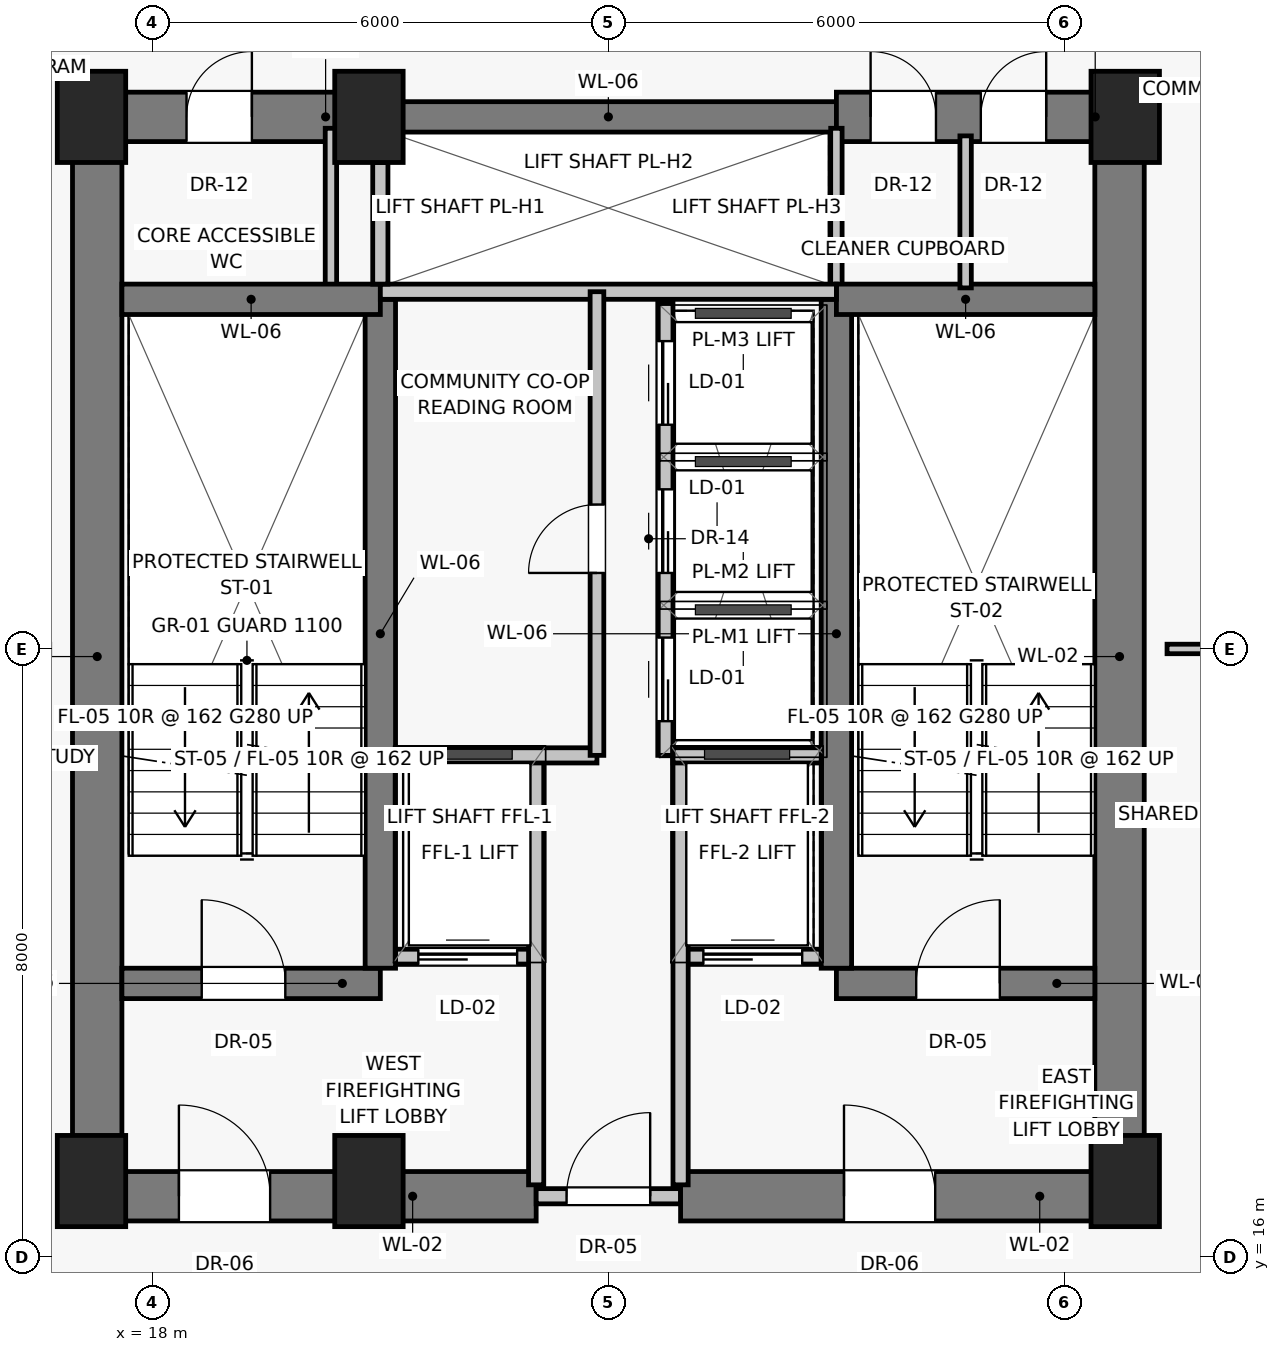
"""IFC4 building model, lengths in metres.
Left out: names, types, materials, properties, quantities, classifications, styles, units other than length and angle.
Written with IfcOpenShell. Run it as: python <this file> out.ifc"""

import sys

from ifc_helpers import new_model, si_unit, direction, frame, frame_2d, origin, origin_2d, place, context, subcontext, project, spatial, rectangle, extrude, source, transform, mapped, element, fill, save


model = new_model("IFC4")
c1 = context("Model", 3, precision=1e-05, world=origin(), true_north=direction((0.0, 1.0)))
c2 = subcontext(c1, "Body", "Model", "MODEL_VIEW")
j1 = project(units=[si_unit("LENGTHUNIT", "METRE"), si_unit("PLANEANGLEUNIT", "RADIAN")], contexts=[c1])
p1 = place(None, origin())
s1 = spatial("IfcSite", under=j1, at=p1, CompositionType="ELEMENT")
p2 = place(p1, origin())
s2 = spatial("IfcBuilding", under=s1, at=p2, CompositionType="ELEMENT")
p3 = place(p2, frame((0.0, 0.0, 113.25)))
s3 = spatial("IfcBuildingStorey", under=s2, at=p3, CompositionType="ELEMENT", Elevation=113.25)
for number, where, z_axis, x_axis in (
    (1, (17.2, 17.0, 0.0), (0.0, 0.0, 1.0), (1.0, 0.0, 0.0)),
    (2, (20.85, 17.0, 0.0), (0.0, 0.0, 1.0), (1.0, 0.0, 0.0)),
    (3, (30.8, 17.0, 0.0), (0.0, 0.0, 1.0), (1.0, 0.0, 0.0)),
    (4, (17.2, 31.0, 0.0), (0.0, 0.0, 1.0), (1.0, 0.0, 0.0)),
    (5, (20.85, 31.0, 0.0), (0.0, 0.0, 1.0), (1.0, 0.0, 0.0)),
    (6, (30.8, 31.0, 0.0), (0.0, 0.0, 1.0), (1.0, 0.0, 0.0)),
):
    element("IfcColumn", number, at=place(p3, frame(where, z_axis=z_axis, x_axis=x_axis)), inside=s3, PredefinedType="PILASTER", context=c2, shape_type="SweptSolid", body=[
        extrude(rectangle(XDim=0.9, YDim=1.2, at=origin_2d()), origin(), (0.0, 0.0, 1.0), 3.25),
    ])
for number, where, z_axis, x_axis in (
    (7, (17.275, 16.8, 0.0), (0.0, 0.0, 1.0), (0.0, 1.0, 0.0)),
    (8, (30.725, 16.8, 0.0), (0.0, 0.0, 1.0), (0.0, 1.0, 0.0)),
):
    element("IfcWall", number, at=place(p3, frame(where, z_axis=z_axis, x_axis=x_axis)), inside=s3, PredefinedType="SHEAR", context=c2, shape_type="SweptSolid", body=[
        extrude(rectangle(XDim=14.2, YDim=0.65, at=frame_2d((7.1, 0.0))), origin(), (0.0, 0.0, 1.0), 3.0),
    ])
p4 = place(p3, frame((17.2, 16.8, 0.0), z_axis=(0.0, 0.0, 1.0), x_axis=(1.0, 0.0, 0.0)))
e9 = element("IfcWall", 9, at=p4, inside=s3, PredefinedType="SHEAR", context=c2, shape_type="SweptSolid", body=[
    extrude(rectangle(XDim=5.85, YDim=0.65, at=frame_2d((2.925, 0.0))), origin(), (0.0, 0.0, 1.0), 3.0),
])
p5 = place(p4, frame((1.15, 0.0, 0.0)))
e10 = element("IfcOpeningElement", 10, at=p5, cuts=e9, PredefinedType="OPENING", context=c2, shape_type="SweptSolid", body=[
    extrude(rectangle(XDim=1.2, YDim=2.03, at=frame_2d((0.6, 1.015))), frame((0.0, 0.335, 0.0), z_axis=(0.0, -1.0, 0.0), x_axis=(1.0, 0.0, 0.0)), (0.0, 0.0, 1.0), 0.67),
])
p6 = place(p3, frame((23.05, 16.8, 0.0), z_axis=(0.0, 0.0, 1.0), x_axis=(1.0, 0.0, 0.0)))
e11 = element("IfcWall", 11, at=p6, inside=s3, PredefinedType="SOLIDWALL", context=c2, shape_type="SweptSolid", body=[
    extrude(rectangle(XDim=1.9, YDim=0.2, at=frame_2d((0.95, 0.0))), origin(), (0.0, 0.0, 1.0), 2.15),
])
p7 = place(p6, frame((0.4, 0.0, 0.0)))
e12 = element("IfcOpeningElement", 12, at=p7, cuts=e11, PredefinedType="OPENING", context=c2, shape_type="SweptSolid", body=[
    extrude(rectangle(XDim=1.1, YDim=2.03, at=frame_2d((0.55, 1.015))), frame((0.0, 0.11, 0.0), z_axis=(0.0, -1.0, 0.0), x_axis=(1.0, 0.0, 0.0)), (0.0, 0.0, 1.0), 0.22),
])
p8 = place(p3, frame((24.95, 16.8, 0.0), z_axis=(0.0, 0.0, 1.0), x_axis=(1.0, 0.0, 0.0)))
e13 = element("IfcWall", 13, at=p8, inside=s3, PredefinedType="SHEAR", context=c2, shape_type="SweptSolid", body=[
    extrude(rectangle(XDim=5.85, YDim=0.65, at=frame_2d((2.925, 0.0))), origin(), (0.0, 0.0, 1.0), 3.0),
])
p9 = place(p8, frame((2.15, 0.0, 0.0)))
e14 = element("IfcOpeningElement", 14, at=p9, cuts=e13, PredefinedType="OPENING", context=c2, shape_type="SweptSolid", body=[
    extrude(rectangle(XDim=1.2, YDim=2.03, at=frame_2d((0.6, 1.015))), frame((0.0, 0.335, 0.0), z_axis=(0.0, -1.0, 0.0), x_axis=(1.0, 0.0, 0.0)), (0.0, 0.0, 1.0), 0.67),
])
p10 = place(p3, frame((17.2, 31.0, 0.0), z_axis=(0.0, 0.0, 1.0), x_axis=(1.0, 0.0, 0.0)))
e15 = element("IfcWall", 15, at=p10, inside=s3, PredefinedType="SHEAR", context=c2, shape_type="SweptSolid", body=[
    extrude(rectangle(XDim=3.8, YDim=0.65, at=frame_2d((1.9, 0.0))), origin(), (0.0, 0.0, 1.0), 3.0),
])
p11 = place(p10, frame((1.25, 0.0, 0.0)))
e16 = element("IfcOpeningElement", 16, at=p11, cuts=e15, PredefinedType="OPENING", context=c2, shape_type="SweptSolid", body=[
    extrude(rectangle(XDim=0.86, YDim=2.01, at=frame_2d((0.43, 1.005))), frame((0.0, 0.335, 0.0), z_axis=(0.0, -1.0, 0.0), x_axis=(1.0, 0.0, 0.0)), (0.0, 0.0, 1.0), 0.67),
])
p12 = place(p3, frame((21.0, 31.0, 0.0), z_axis=(0.0, 0.0, 1.0), x_axis=(1.0, 0.0, 0.0)))
e17 = element("IfcWall", 17, at=p12, inside=s3, PredefinedType="SHEAR", context=c2, shape_type="SweptSolid", body=[
    extrude(rectangle(XDim=6.0, YDim=0.4, at=frame_2d((3.0, 0.0))), origin(), (0.0, 0.0, 1.0), 3.0),
])
p13 = place(p3, frame((27.0, 31.0, 0.0), z_axis=(0.0, 0.0, 1.0), x_axis=(1.0, 0.0, 0.0)))
e18 = element("IfcWall", 18, at=p13, inside=s3, PredefinedType="SHEAR", context=c2, shape_type="SweptSolid", body=[
    extrude(rectangle(XDim=3.8, YDim=0.65, at=frame_2d((1.9, 0.0))), origin(), (0.0, 0.0, 1.0), 3.0),
])
p14 = place(p13, frame((0.45, 0.0, 0.0)))
e19 = element("IfcOpeningElement", 19, at=p14, cuts=e18, PredefinedType="OPENING", context=c2, shape_type="SweptSolid", body=[
    extrude(rectangle(XDim=0.86, YDim=2.01, at=frame_2d((0.43, 1.005))), frame((0.0, 0.335, 0.0), z_axis=(0.0, -1.0, 0.0), x_axis=(1.0, 0.0, 0.0)), (0.0, 0.0, 1.0), 0.67),
])
p15 = place(p13, frame((1.9, 0.0, 0.0)))
e20 = element("IfcOpeningElement", 20, at=p15, cuts=e18, PredefinedType="OPENING", context=c2, shape_type="SweptSolid", body=[
    extrude(rectangle(XDim=0.86, YDim=2.01, at=frame_2d((0.43, 1.005))), frame((0.0, 0.335, 0.0), z_axis=(0.0, -1.0, 0.0), x_axis=(1.0, 0.0, 0.0)), (0.0, 0.0, 1.0), 0.67),
])
for number, where, z_axis, x_axis in (
    (21, (20.35, 28.65, 0.0), (0.0, 0.0, 1.0), (0.0, 1.0, 0.0)),
    (22, (27.0, 28.65, 0.0), (0.0, 0.0, 1.0), (0.0, 1.0, 0.0)),
):
    element("IfcWall", number, at=place(p3, frame(where, z_axis=z_axis, x_axis=x_axis)), inside=s3, PredefinedType="PARTITIONING", context=c2, shape_type="SweptSolid", body=[
        extrude(rectangle(XDim=2.2, YDim=0.15, at=frame_2d((1.1, 0.0))), origin(), (0.0, 0.0, 1.0), 3.0),
    ])
p16 = place(p3, frame((17.6, 19.6, 0.0), z_axis=(0.0, 0.0, 1.0), x_axis=(1.0, 0.0, 0.0)))
e23 = element("IfcWall", 23, at=p16, inside=s3, PredefinedType="SHEAR", context=c2, shape_type="SweptSolid", body=[
    extrude(rectangle(XDim=3.4, YDim=0.4, at=frame_2d((1.7, 0.0))), origin(), (0.0, 0.0, 1.0), 3.0),
])
p17 = place(p16, frame((1.05, 0.0, 0.0)))
e24 = element("IfcOpeningElement", 24, at=p17, cuts=e23, PredefinedType="OPENING", context=c2, shape_type="SweptSolid", body=[
    extrude(rectangle(XDim=1.1, YDim=2.03, at=frame_2d((0.55, 1.015))), frame((0.0, 0.21, 0.0), z_axis=(0.0, -1.0, 0.0), x_axis=(1.0, 0.0, 0.0)), (0.0, 0.0, 1.0), 0.42),
])
p18 = place(p3, frame((21.2, 19.95, 0.0), z_axis=(0.0, 0.0, 1.0), x_axis=(1.0, 0.0, 0.0)))
e25 = element("IfcWall", 25, at=p18, inside=s3, PredefinedType="SOLIDWALL", context=c2, shape_type="SweptSolid", body=[
    extrude(rectangle(XDim=1.85, YDim=0.2, at=frame_2d((0.925, 0.0))), origin(), (0.0, 0.0, 1.0), 3.0),
])
p19 = place(p18, frame((0.3, 0.0, 0.0)))
e26 = element("IfcOpeningElement", 26, at=p19, cuts=e25, PredefinedType="OPENING", context=c2, shape_type="SweptSolid", body=[
    extrude(rectangle(XDim=1.3, YDim=2.25, at=frame_2d((0.65, 1.125))), frame((0.0, 0.11, 0.0), z_axis=(0.0, -1.0, 0.0), x_axis=(1.0, 0.0, 0.0)), (0.0, 0.0, 1.0), 0.22),
])
p20 = place(p3, frame((24.95, 19.95, 0.0), z_axis=(0.0, 0.0, 1.0), x_axis=(1.0, 0.0, 0.0)))
e27 = element("IfcWall", 27, at=p20, inside=s3, PredefinedType="SOLIDWALL", context=c2, shape_type="SweptSolid", body=[
    extrude(rectangle(XDim=1.85, YDim=0.2, at=frame_2d((0.925, 0.0))), origin(), (0.0, 0.0, 1.0), 3.0),
])
p21 = place(p20, frame((0.3, 0.0, 0.0)))
e28 = element("IfcOpeningElement", 28, at=p21, cuts=e27, PredefinedType="OPENING", context=c2, shape_type="SweptSolid", body=[
    extrude(rectangle(XDim=1.3, YDim=2.25, at=frame_2d((0.65, 1.125))), frame((0.0, 0.11, 0.0), z_axis=(0.0, -1.0, 0.0), x_axis=(1.0, 0.0, 0.0)), (0.0, 0.0, 1.0), 0.22),
])
p22 = place(p3, frame((27.0, 19.6, 0.0), z_axis=(0.0, 0.0, 1.0), x_axis=(1.0, 0.0, 0.0)))
e29 = element("IfcWall", 29, at=p22, inside=s3, PredefinedType="SHEAR", context=c2, shape_type="SweptSolid", body=[
    extrude(rectangle(XDim=3.4, YDim=0.4, at=frame_2d((1.7, 0.0))), origin(), (0.0, 0.0, 1.0), 3.0),
])
p23 = place(p22, frame((1.05, 0.0, 0.0)))
e30 = element("IfcOpeningElement", 30, at=p23, cuts=e29, PredefinedType="OPENING", context=c2, shape_type="SweptSolid", body=[
    extrude(rectangle(XDim=1.1, YDim=2.03, at=frame_2d((0.55, 1.015))), frame((0.0, 0.21, 0.0), z_axis=(0.0, -1.0, 0.0), x_axis=(1.0, 0.0, 0.0)), (0.0, 0.0, 1.0), 0.42),
])
for number, where, z_axis, x_axis in (
    (31, (21.0, 19.8, 0.0), (0.0, 0.0, 1.0), (0.0, 1.0, 0.0)),
    (32, (27.0, 19.8, 0.0), (0.0, 0.0, 1.0), (0.0, 1.0, 0.0)),
):
    element("IfcWall", number, at=place(p3, frame(where, z_axis=z_axis, x_axis=x_axis)), inside=s3, PredefinedType="SHEAR", context=c2, shape_type="SweptSolid", body=[
        extrude(rectangle(XDim=8.8, YDim=0.4, at=frame_2d((4.4, 0.0))), origin(), (0.0, 0.0, 1.0), 3.0),
    ])
for number, where, z_axis, x_axis in (
    (33, (17.6, 28.6, 0.0), (0.0, 0.0, 1.0), (1.0, 0.0, 0.0)),
    (34, (27.0, 28.6, 0.0), (0.0, 0.0, 1.0), (1.0, 0.0, 0.0)),
):
    element("IfcWall", number, at=place(p3, frame(where, z_axis=z_axis, x_axis=x_axis)), inside=s3, PredefinedType="SHEAR", context=c2, shape_type="SweptSolid", body=[
        extrude(rectangle(XDim=3.4, YDim=0.4, at=frame_2d((1.7, 0.0))), origin(), (0.0, 0.0, 1.0), 3.0),
    ])
for number, where, z_axis, x_axis in (
    (35, (23.05, 16.95, 0.0), (0.0, 0.0, 1.0), (0.0, 1.0, 0.0)),
    (36, (24.95, 16.95, 0.0), (0.0, 0.0, 1.0), (0.0, 1.0, 0.0)),
):
    element("IfcWall", number, at=place(p3, frame(where, z_axis=z_axis, x_axis=x_axis)), inside=s3, PredefinedType="SOLIDWALL", context=c2, shape_type="SweptSolid", body=[
        extrude(rectangle(XDim=5.6, YDim=0.2, at=frame_2d((2.8, 0.0))), origin(), (0.0, 0.0, 1.0), 3.0),
    ])
p24 = place(p3, frame((21.2, 22.6, 0.0), z_axis=(0.0, 0.0, 1.0), x_axis=(1.0, 0.0, 0.0)))
e37 = element("IfcWall", 37, at=p24, inside=s3, PredefinedType="SOLIDWALL", context=c2, shape_type="SweptSolid", body=[
    extrude(rectangle(XDim=2.65, YDim=0.2, at=frame_2d((1.325, 0.0))), origin(), (0.0, 0.0, 1.0), 3.0),
])
p25 = place(p3, frame((24.85, 22.6, 0.0), z_axis=(0.0, 0.0, 1.0), x_axis=(1.0, 0.0, 0.0)))
e38 = element("IfcWall", 38, at=p25, inside=s3, PredefinedType="SOLIDWALL", context=c2, shape_type="SweptSolid", body=[
    extrude(rectangle(XDim=1.95, YDim=0.2, at=frame_2d((0.975, 0.0))), origin(), (0.0, 0.0, 1.0), 3.0),
])
p26 = place(p3, frame((21.0, 28.7, 0.0), z_axis=(0.0, 0.0, 1.0), x_axis=(1.0, 0.0, 0.0)))
e39 = element("IfcWall", 39, at=p26, inside=s3, PredefinedType="SOLIDWALL", context=c2, shape_type="SweptSolid", body=[
    extrude(rectangle(XDim=6.0, YDim=0.2, at=frame_2d((3.0, 0.0))), origin(), (0.0, 0.0, 1.0), 3.0),
])
p27 = place(p3, frame((21.0, 28.8, 0.0), z_axis=(0.0, 0.0, 1.0), x_axis=(0.0, 1.0, 0.0)))
e40 = element("IfcWall", 40, at=p27, inside=s3, PredefinedType="SOLIDWALL", context=c2, shape_type="SweptSolid", body=[
    extrude(rectangle(XDim=1.6, YDim=0.2, at=frame_2d((0.8, 0.0))), origin(), (0.0, 0.0, 1.0), 3.0),
])
p28 = place(p3, frame((23.85, 22.6, 0.0), z_axis=(0.0, 0.0, 1.0), x_axis=(0.0, 1.0, 0.0)))
e41 = element("IfcWall", 41, at=p28, inside=s3, PredefinedType="PARTITIONING", context=c2, shape_type="SweptSolid", body=[
    extrude(rectangle(XDim=6.1, YDim=0.18, at=frame_2d((3.05, 0.0))), origin(), (0.0, 0.0, 1.0), 3.0),
])
p29 = place(p28, frame((2.4, 0.0, 0.0)))
e42 = element("IfcOpeningElement", 42, at=p29, cuts=e41, PredefinedType="OPENING", context=c2, shape_type="SweptSolid", body=[
    extrude(rectangle(XDim=0.9, YDim=2.01, at=frame_2d((0.45, 1.005))), frame((0.0, 0.1, 0.0), z_axis=(0.0, -1.0, 0.0), x_axis=(1.0, 0.0, 0.0)), (0.0, 0.0, 1.0), 0.2),
])
p30 = place(p3, frame((24.75, 22.6, 0.0), z_axis=(0.0, 0.0, 1.0), x_axis=(0.0, 1.0, 0.0)))
e43 = element("IfcWall", 43, at=p30, inside=s3, PredefinedType="SOLIDWALL", context=c2, shape_type="SweptSolid", body=[
    extrude(rectangle(XDim=5.95, YDim=0.2, at=frame_2d((2.975, 0.0))), origin(), (0.0, 0.0, 1.0), 3.0),
])
p31 = place(p30, frame((0.45, 0.0, 0.0)))
e44 = element("IfcOpeningElement", 44, at=p31, cuts=e43, PredefinedType="OPENING", context=c2, shape_type="SweptSolid", body=[
    extrude(rectangle(XDim=1.1, YDim=2.08, at=frame_2d((0.55, 1.04))), frame((0.0, 0.11, 0.0), z_axis=(0.0, -1.0, 0.0), x_axis=(1.0, 0.0, 0.0)), (0.0, 0.0, 1.0), 0.22),
])
p32 = place(p30, frame((2.4, 0.0, 0.0)))
e45 = element("IfcOpeningElement", 45, at=p32, cuts=e43, PredefinedType="OPENING", context=c2, shape_type="SweptSolid", body=[
    extrude(rectangle(XDim=1.1, YDim=2.08, at=frame_2d((0.55, 1.04))), frame((0.0, 0.11, 0.0), z_axis=(0.0, -1.0, 0.0), x_axis=(1.0, 0.0, 0.0)), (0.0, 0.0, 1.0), 0.22),
])
p33 = place(p30, frame((4.35, 0.0, 0.0)))
e46 = element("IfcOpeningElement", 46, at=p33, cuts=e43, PredefinedType="OPENING", context=c2, shape_type="SweptSolid", body=[
    extrude(rectangle(XDim=1.1, YDim=2.08, at=frame_2d((0.55, 1.04))), frame((0.0, 0.11, 0.0), z_axis=(0.0, -1.0, 0.0), x_axis=(1.0, 0.0, 0.0)), (0.0, 0.0, 1.0), 0.22),
])
p34 = place(p3, frame((28.7, 28.75, 0.0), z_axis=(0.0, 0.0, 1.0), x_axis=(0.0, 1.0, 0.0)))
e47 = element("IfcWall", 47, at=p34, inside=s3, PredefinedType="PARTITIONING", context=c2, shape_type="SweptSolid", body=[
    extrude(rectangle(XDim=2.0, YDim=0.15, at=frame_2d((1.0, 0.0))), origin(), (0.0, 0.0, 1.0), 3.0),
])
p35 = place(p3, frame((31.35, 24.0, 0.0), z_axis=(0.0, 0.0, 1.0), x_axis=(1.0, 0.0, 0.0)))
e48 = element("IfcWall", 48, at=p35, inside=s3, PredefinedType="PARTITIONING", context=c2, shape_type="SweptSolid", body=[
    extrude(rectangle(XDim=2.1, YDim=0.125, at=frame_2d((1.05, 0.0))), origin(), (0.0, 0.0, 1.0), 3.0),
])
m1 = source(origin(), c2, "Body", "SweptSolid", [
    extrude(rectangle(XDim=1.2, YDim=2.03, at=frame_2d((0.6, 1.015))), frame((0.0, 0.025, 0.0), z_axis=(0.0, -1.0, 0.0), x_axis=(1.0, 0.0, 0.0)), (0.0, 0.0, 1.0), 0.05),
])
p36 = place(p5, origin())
e49 = element("IfcDoor", 49, at=p36, inside=s3, OperationType="SINGLE_SWING_LEFT", PredefinedType="DOOR", context=c2, shape_type="MappedRepresentation", body=[
    mapped(m1, transform((0.0, 0.0, 0.0), scale=1.0)),
])
fill(e10, e49)
m2 = source(origin(), c2, "Body", "SweptSolid", [
    extrude(rectangle(XDim=1.1, YDim=2.03, at=frame_2d((0.55, 1.015))), frame((0.0, 0.025, 0.0), z_axis=(0.0, -1.0, 0.0), x_axis=(1.0, 0.0, 0.0)), (0.0, 0.0, 1.0), 0.05),
])
p37 = place(p7, origin())
e50 = element("IfcDoor", 50, at=p37, inside=s3, OperationType="SINGLE_SWING_RIGHT", PredefinedType="DOOR", context=c2, shape_type="MappedRepresentation", body=[
    mapped(m2, transform((0.0, 0.0, 0.0), scale=1.0)),
])
fill(e12, e50)
p38 = place(p9, origin())
e51 = element("IfcDoor", 51, at=p38, inside=s3, OperationType="SINGLE_SWING_LEFT", PredefinedType="DOOR", context=c2, shape_type="MappedRepresentation", body=[
    mapped(m1, transform((0.0, 0.0, 0.0), scale=1.0)),
])
fill(e14, e51)
m3 = source(origin(), c2, "Body", "SweptSolid", [
    extrude(rectangle(XDim=0.86, YDim=2.01, at=frame_2d((0.43, 1.005))), frame((0.0, 0.025, 0.0), z_axis=(0.0, -1.0, 0.0), x_axis=(1.0, 0.0, 0.0)), (0.0, 0.0, 1.0), 0.05),
])
p39 = place(p11, origin())
e52 = element("IfcDoor", 52, at=p39, inside=s3, OperationType="SINGLE_SWING_RIGHT", PredefinedType="DOOR", context=c2, shape_type="MappedRepresentation", body=[
    mapped(m3, transform((0.0, 0.0, 0.0), scale=1.0)),
])
fill(e16, e52)
p40 = place(p14, origin())
e53 = element("IfcDoor", 53, at=p40, inside=s3, OperationType="SINGLE_SWING_LEFT", PredefinedType="DOOR", context=c2, shape_type="MappedRepresentation", body=[
    mapped(m3, transform((0.0, 0.0, 0.0), scale=1.0)),
])
fill(e19, e53)
p41 = place(p15, origin())
e54 = element("IfcDoor", 54, at=p41, inside=s3, OperationType="SINGLE_SWING_RIGHT", PredefinedType="DOOR", context=c2, shape_type="MappedRepresentation", body=[
    mapped(m3, transform((0.0, 0.0, 0.0), scale=1.0)),
])
fill(e20, e54)
p42 = place(p17, origin())
e55 = element("IfcDoor", 55, at=p42, inside=s3, OperationType="SINGLE_SWING_LEFT", PredefinedType="DOOR", context=c2, shape_type="MappedRepresentation", body=[
    mapped(m2, transform((0.0, 0.0, 0.0), scale=1.0)),
])
fill(e24, e55)
m4 = source(origin(), c2, "Body", "SweptSolid", [
    extrude(rectangle(XDim=1.3, YDim=2.25, at=frame_2d((0.65, 1.125))), frame((0.0, 0.025, 0.0), z_axis=(0.0, -1.0, 0.0), x_axis=(1.0, 0.0, 0.0)), (0.0, 0.0, 1.0), 0.05),
])
p43 = place(p19, origin())
e56 = element("IfcDoor", 56, at=p43, inside=s3, OperationType="SLIDING_TO_LEFT", PredefinedType="DOOR", context=c2, shape_type="MappedRepresentation", body=[
    mapped(m4, transform((0.0, 0.0, 0.0), scale=1.0)),
])
fill(e26, e56)
p44 = place(p21, origin())
e57 = element("IfcDoor", 57, at=p44, inside=s3, OperationType="SLIDING_TO_LEFT", PredefinedType="DOOR", context=c2, shape_type="MappedRepresentation", body=[
    mapped(m4, transform((0.0, 0.0, 0.0), scale=1.0)),
])
fill(e28, e57)
p45 = place(p23, origin())
e58 = element("IfcDoor", 58, at=p45, inside=s3, OperationType="SINGLE_SWING_RIGHT", PredefinedType="DOOR", context=c2, shape_type="MappedRepresentation", body=[
    mapped(m2, transform((0.0, 0.0, 0.0), scale=1.0)),
])
fill(e30, e58)
m5 = source(origin(), c2, "Body", "SweptSolid", [
    extrude(rectangle(XDim=0.9, YDim=2.01, at=frame_2d((0.45, 1.005))), frame((0.0, 0.025, 0.0), z_axis=(0.0, -1.0, 0.0), x_axis=(1.0, 0.0, 0.0)), (0.0, 0.0, 1.0), 0.05),
])
p46 = place(p29, origin())
e59 = element("IfcDoor", 59, at=p46, inside=s3, OperationType="SINGLE_SWING_LEFT", PredefinedType="DOOR", context=c2, shape_type="MappedRepresentation", body=[
    mapped(m5, transform((0.0, 0.0, 0.0), scale=1.0)),
])
fill(e42, e59)
m6 = source(origin(), c2, "Body", "SweptSolid", [
    extrude(rectangle(XDim=1.1, YDim=2.08, at=frame_2d((0.55, 1.04))), frame((0.0, 0.025, 0.0), z_axis=(0.0, -1.0, 0.0), x_axis=(1.0, 0.0, 0.0)), (0.0, 0.0, 1.0), 0.05),
])
p47 = place(p31, origin())
e60 = element("IfcDoor", 60, at=p47, inside=s3, OperationType="SLIDING_TO_LEFT", PredefinedType="DOOR", context=c2, shape_type="MappedRepresentation", body=[
    mapped(m6, transform((0.0, 0.0, 0.0), scale=1.0)),
])
fill(e44, e60)
p48 = place(p32, origin())
e61 = element("IfcDoor", 61, at=p48, inside=s3, OperationType="SLIDING_TO_LEFT", PredefinedType="DOOR", context=c2, shape_type="MappedRepresentation", body=[
    mapped(m6, transform((0.0, 0.0, 0.0), scale=1.0)),
])
fill(e45, e61)
p49 = place(p33, origin())
e62 = element("IfcDoor", 62, at=p49, inside=s3, OperationType="SLIDING_TO_LEFT", PredefinedType="DOOR", context=c2, shape_type="MappedRepresentation", body=[
    mapped(m6, transform((0.0, 0.0, 0.0), scale=1.0)),
])
fill(e46, e62)
save(model, sys.argv[1])
